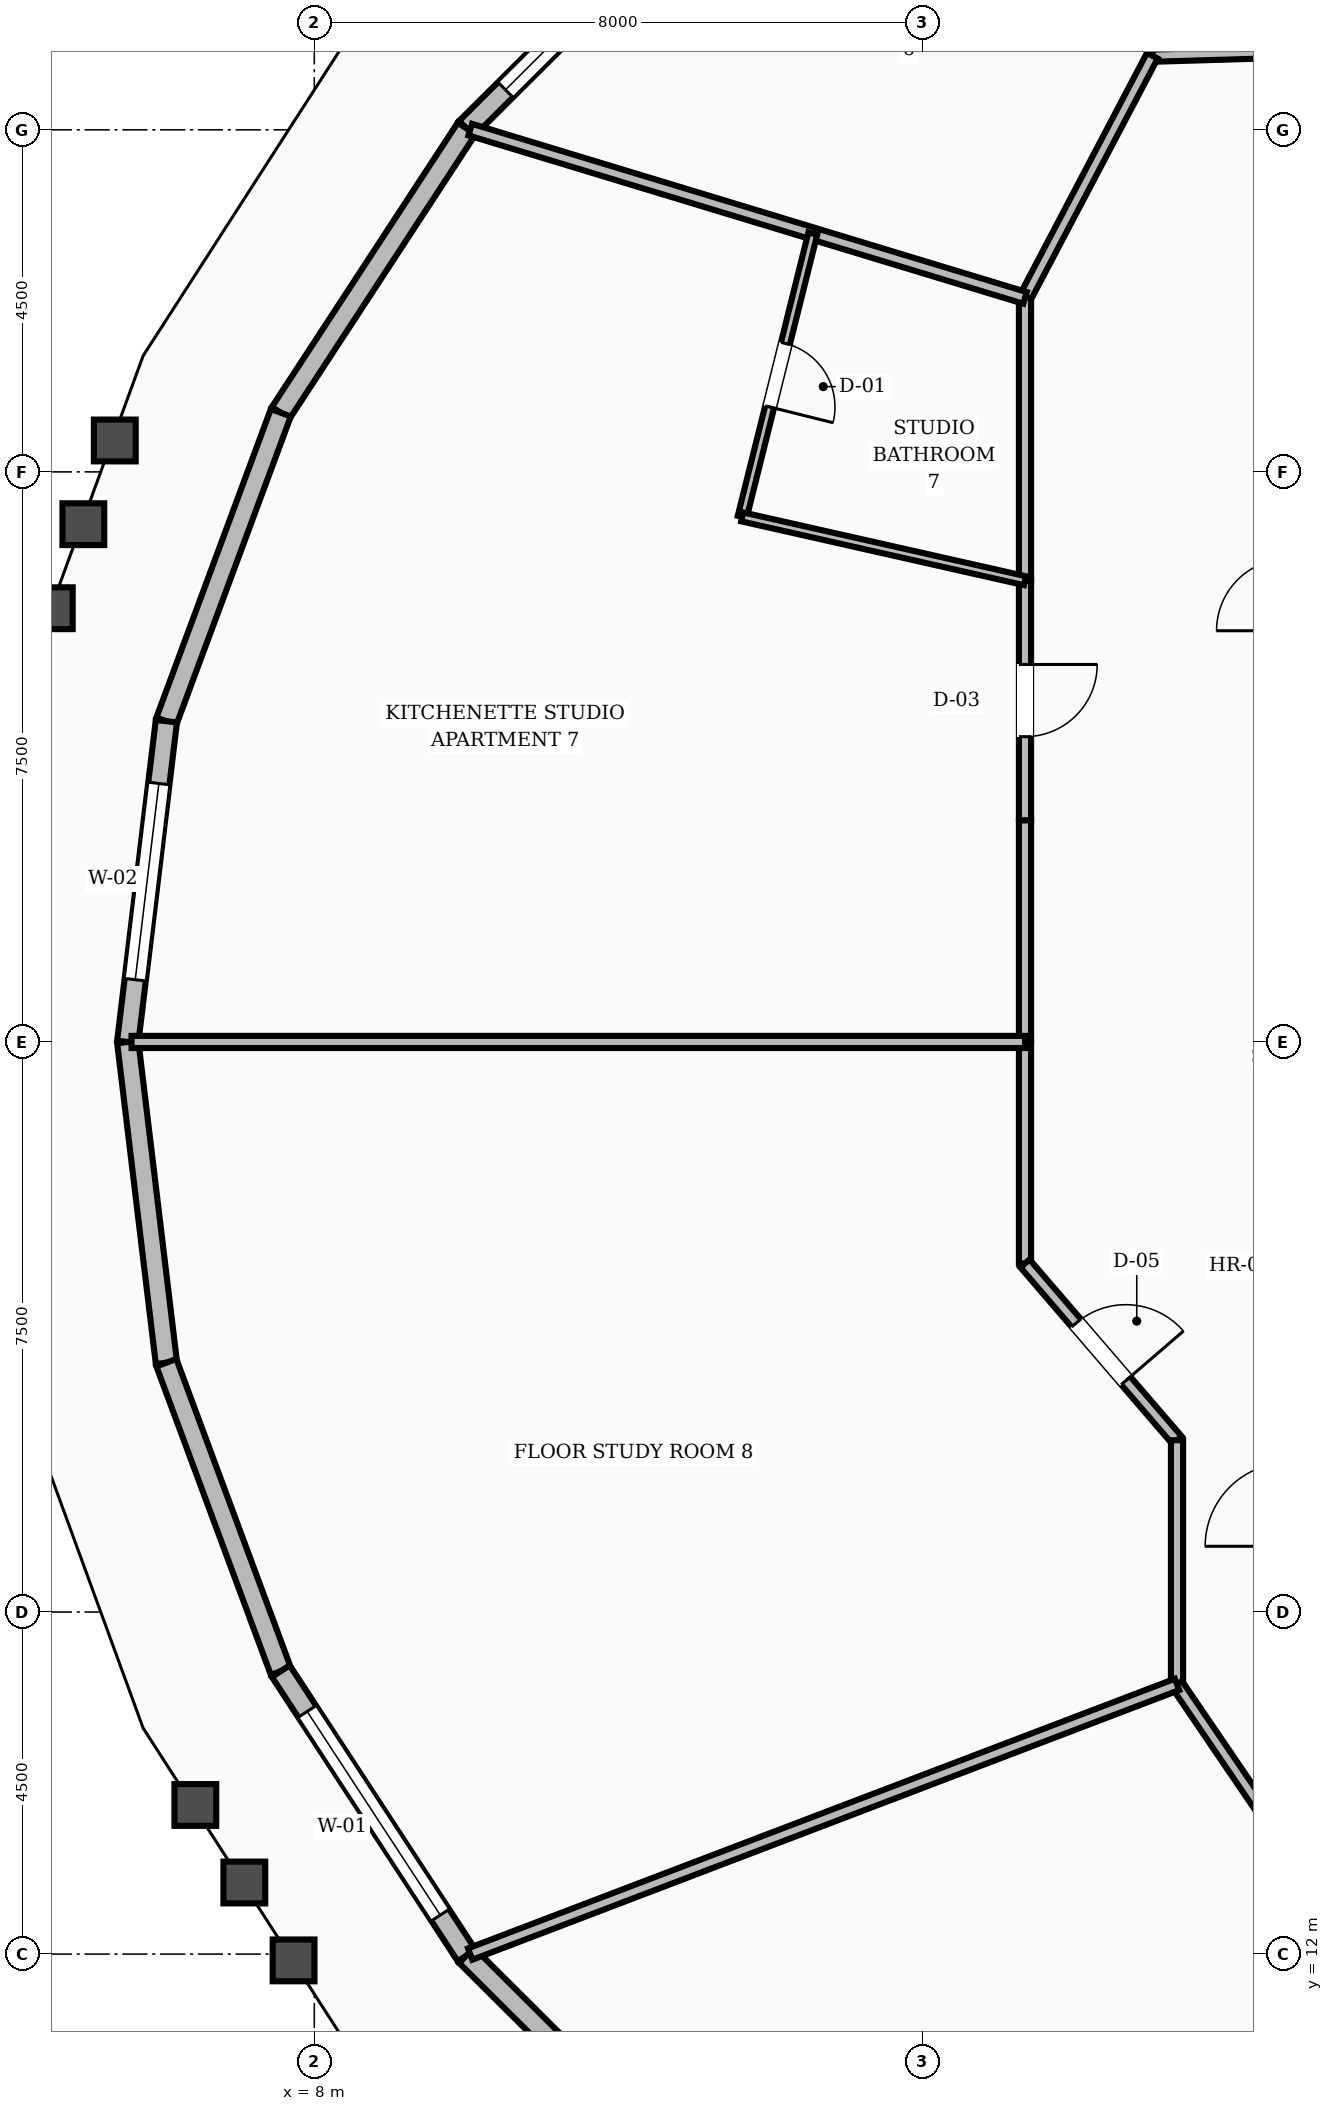
"""IFC4 building model, lengths in metres.
Left out: names, types, materials, properties, quantities, classifications, styles, units other than length and angle.
Written with IfcOpenShell. Run it as: python <this file> out.ifc"""

import sys

from ifc_helpers import new_model, si_unit, direction, frame, frame_2d, origin, place, context, subcontext, project, spatial, rectangle, extrude, element, fill, save


model = new_model("IFC4")
c1 = context("Model", 3, precision=1e-05, world=origin(), true_north=direction((0.0, 1.0)))
c2 = subcontext(c1, "Body", "Model", "MODEL_VIEW")
j1 = project(units=[si_unit("LENGTHUNIT", "METRE"), si_unit("PLANEANGLEUNIT", "RADIAN")], contexts=[c1])
p1 = place(None, origin())
s1 = spatial("IfcSite", under=j1, at=p1, CompositionType="ELEMENT")
p2 = place(p1, origin())
s2 = spatial("IfcBuilding", under=s1, at=p2, CompositionType="ELEMENT")
p3 = place(p2, frame((0.0, 0.0, 142.4)))
s3 = spatial("IfcBuildingStorey", under=s2, at=p3, CompositionType="ELEMENT", Elevation=142.4)
p4 = place(p3, frame((13.294, 39.295, 0.0), z_axis=(0.0, 0.0, 1.0), x_axis=(-0.708393596514, -0.705817619799, 0.0)))
e1 = element("IfcWall", 1, at=p4, inside=s3, PredefinedType="STANDARD", context=c2, shape_type="SweptSolid", body=[
    extrude(rectangle(XDim=4.644, YDim=0.28, at=frame_2d((2.322, 0.0))), origin(), (0.0, 0.0, 1.0), 2.82),
])
p5 = place(p4, frame((0.722, 0.0, 0.8)))
e2 = element("IfcOpeningElement", 2, at=p5, cuts=e1, PredefinedType="OPENING", context=c2, shape_type="SweptSolid", body=[
    extrude(rectangle(XDim=3.2, YDim=1.65, at=frame_2d((1.6, 0.825))), frame((0.0, 0.15, 0.0), z_axis=(0.0, -1.0, 0.0), x_axis=(1.0, 0.0, 0.0)), (0.0, 0.0, 1.0), 0.3),
])
p6 = place(p3, frame((10.004, 36.017, 0.0), z_axis=(0.0, 0.0, 1.0), x_axis=(-0.547212555107, -0.836993679506, 0.0)))
e3 = element("IfcWall", 3, at=p6, inside=s3, PredefinedType="STANDARD", context=c2, shape_type="SweptSolid", body=[
    extrude(rectangle(XDim=4.468, YDim=0.28, at=frame_2d((2.234, 0.0))), origin(), (0.0, 0.0, 1.0), 2.82),
])
p7 = place(p3, frame((7.559, 32.278, 0.0), z_axis=(0.0, 0.0, 1.0), x_axis=(-0.347832416273, -0.937556723719, 0.0)))
e4 = element("IfcWall", 4, at=p7, inside=s3, PredefinedType="STANDARD", context=c2, shape_type="SweptSolid", body=[
    extrude(rectangle(XDim=4.328, YDim=0.28, at=frame_2d((2.164, 0.0))), origin(), (0.0, 0.0, 1.0), 2.82),
])
p8 = place(p3, frame((6.054, 28.22, 0.0), z_axis=(0.0, 0.0, 1.0), x_axis=(-0.119586868896, -0.992823741048, 0.0)))
e5 = element("IfcWall", 5, at=p8, inside=s3, PredefinedType="STANDARD", context=c2, shape_type="SweptSolid", body=[
    extrude(rectangle(XDim=4.25, YDim=0.28, at=frame_2d((2.125, 0.0))), origin(), (0.0, 0.0, 1.0), 2.82),
])
p9 = place(p8, frame((0.825, 0.0, 0.8)))
e6 = element("IfcOpeningElement", 6, at=p9, cuts=e5, PredefinedType="OPENING", context=c2, shape_type="SweptSolid", body=[
    extrude(rectangle(XDim=2.6, YDim=1.65, at=frame_2d((1.3, 0.825))), frame((0.0, 0.15, 0.0), z_axis=(0.0, -1.0, 0.0), x_axis=(1.0, 0.0, 0.0)), (0.0, 0.0, 1.0), 0.3),
])
p10 = place(p3, frame((5.545, 24.0, 0.0), z_axis=(0.0, 0.0, 1.0), x_axis=(0.119586868896, -0.992823741048, 0.0)))
e7 = element("IfcWall", 7, at=p10, inside=s3, PredefinedType="STANDARD", context=c2, shape_type="SweptSolid", body=[
    extrude(rectangle(XDim=4.25, YDim=0.28, at=frame_2d((2.125, 0.0))), origin(), (0.0, 0.0, 1.0), 2.82),
])
p11 = place(p3, frame((6.054, 19.78, 0.0), z_axis=(0.0, 0.0, 1.0), x_axis=(0.347832416273, -0.937556723719, 0.0)))
e8 = element("IfcWall", 8, at=p11, inside=s3, PredefinedType="STANDARD", context=c2, shape_type="SweptSolid", body=[
    extrude(rectangle(XDim=4.328, YDim=0.28, at=frame_2d((2.164, 0.0))), origin(), (0.0, 0.0, 1.0), 2.82),
])
p12 = place(p3, frame((7.559, 15.722, 0.0), z_axis=(0.0, 0.0, 1.0), x_axis=(0.547212555107, -0.836993679506, 0.0)))
e9 = element("IfcWall", 9, at=p12, inside=s3, PredefinedType="STANDARD", context=c2, shape_type="SweptSolid", body=[
    extrude(rectangle(XDim=4.468, YDim=0.28, at=frame_2d((2.234, 0.0))), origin(), (0.0, 0.0, 1.0), 2.82),
])
p13 = place(p12, frame((0.634, 0.0, 0.8)))
e10 = element("IfcOpeningElement", 10, at=p13, cuts=e9, PredefinedType="OPENING", context=c2, shape_type="SweptSolid", body=[
    extrude(rectangle(XDim=3.2, YDim=1.65, at=frame_2d((1.6, 0.825))), frame((0.0, 0.15, 0.0), z_axis=(0.0, -1.0, 0.0), x_axis=(1.0, 0.0, 0.0)), (0.0, 0.0, 1.0), 0.3),
])
p14 = place(p3, frame((10.004, 11.983, 0.0), z_axis=(0.0, 0.0, 1.0), x_axis=(0.708393596514, -0.705817619799, 0.0)))
e11 = element("IfcWall", 11, at=p14, inside=s3, PredefinedType="STANDARD", context=c2, shape_type="SweptSolid", body=[
    extrude(rectangle(XDim=4.644, YDim=0.28, at=frame_2d((2.322, 0.0))), origin(), (0.0, 0.0, 1.0), 2.82),
])
p15 = place(p3, frame((23.247, 37.1, 0.0), z_axis=(0.0, 0.0, 1.0), x_axis=(-0.999561990195, -0.029594387265, 0.0)))
e12 = element("IfcWall", 12, at=p15, inside=s3, PredefinedType="SOLIDWALL", context=c2, shape_type="SweptSolid", body=[
    extrude(rectangle(XDim=4.224, YDim=0.16, at=frame_2d((2.112, 0.0))), origin(), (0.0, 0.0, 1.0), 2.8),
])
p16 = place(p15, frame((1.637, 0.0, 0.0)))
e13 = element("IfcOpeningElement", 13, at=p16, cuts=e12, PredefinedType="OPENING", context=c2, shape_type="SweptSolid", body=[
    extrude(rectangle(XDim=0.95, YDim=2.1, at=frame_2d((0.475, 1.05))), frame((0.0, 0.09, 0.0), z_axis=(0.0, -1.0, 0.0), x_axis=(1.0, 0.0, 0.0)), (0.0, 0.0, 1.0), 0.18),
])
p17 = place(p3, frame((19.025, 36.975, 0.0), z_axis=(0.0, 0.0, 1.0), x_axis=(-0.46527115782, -0.885168204185, 0.0)))
e14 = element("IfcWall", 14, at=p17, inside=s3, PredefinedType="SOLIDWALL", context=c2, shape_type="SweptSolid", body=[
    extrude(rectangle(XDim=3.6, YDim=0.16, at=frame_2d((1.8, 0.0))), origin(), (0.0, 0.0, 1.0), 2.8),
])
p18 = place(p3, frame((17.35, 33.789, 0.0), z_axis=(0.0, 0.0, 1.0), x_axis=(0.0, -1.0, 0.0)))
e15 = element("IfcWall", 15, at=p18, inside=s3, PredefinedType="SOLIDWALL", context=c2, shape_type="SweptSolid", body=[
    extrude(rectangle(XDim=3.721, YDim=0.16, at=frame_2d((1.86, 0.0))), origin(), (0.0, 0.0, 1.0), 2.8),
])
p19 = place(p3, frame((17.35, 30.068, 0.0), z_axis=(0.0, 0.0, 1.0), x_axis=(0.0, -1.0, 0.0)))
e16 = element("IfcWall", 16, at=p19, inside=s3, PredefinedType="SOLIDWALL", context=c2, shape_type="SweptSolid", body=[
    extrude(rectangle(XDim=3.154, YDim=0.16, at=frame_2d((1.577, 0.0))), origin(), (0.0, 0.0, 1.0), 2.8),
])
p20 = place(p19, frame((1.102, 0.0, 0.0)))
e17 = element("IfcOpeningElement", 17, at=p20, cuts=e16, PredefinedType="OPENING", context=c2, shape_type="SweptSolid", body=[
    extrude(rectangle(XDim=0.95, YDim=2.1, at=frame_2d((0.475, 1.05))), frame((0.0, 0.09, 0.0), z_axis=(0.0, -1.0, 0.0), x_axis=(1.0, 0.0, 0.0)), (0.0, 0.0, 1.0), 0.18),
])
for number, where, z_axis, x_axis in (
    (18, (17.35, 26.914, 0.0), (0.0, 0.0, 1.0), (0.0, -1.0, 0.0)),
    (19, (17.35, 24.0, 0.0), (0.0, 0.0, 1.0), (0.0, -1.0, 0.0)),
):
    element("IfcWall", number, at=place(p3, frame(where, z_axis=z_axis, x_axis=x_axis)), inside=s3, PredefinedType="SOLIDWALL", context=c2, shape_type="SweptSolid", body=[
        extrude(rectangle(XDim=2.914, YDim=0.16, at=frame_2d((1.457, 0.0))), origin(), (0.0, 0.0, 1.0), 2.8),
    ])
p21 = place(p3, frame((17.35, 21.086, 0.0), z_axis=(0.0, 0.0, 1.0), x_axis=(0.652022797448, -0.758199361388, 0.0)))
e20 = element("IfcWall", 20, at=p21, inside=s3, PredefinedType="SOLIDWALL", context=c2, shape_type="SweptSolid", body=[
    extrude(rectangle(XDim=3.067, YDim=0.16, at=frame_2d((1.534, 0.0))), origin(), (0.0, 0.0, 1.0), 2.8),
])
p22 = place(p21, frame((1.034, 0.0, 0.0)))
e21 = element("IfcOpeningElement", 21, at=p22, cuts=e20, PredefinedType="OPENING", context=c2, shape_type="SweptSolid", body=[
    extrude(rectangle(XDim=1.0, YDim=2.1, at=frame_2d((0.5, 1.05))), frame((0.0, 0.09, 0.0), z_axis=(0.0, -1.0, 0.0), x_axis=(1.0, 0.0, 0.0)), (0.0, 0.0, 1.0), 0.18),
])
p23 = place(p3, frame((19.35, 18.76, 0.0), z_axis=(0.0, 0.0, 1.0), x_axis=(0.0, -1.0, 0.0)))
e22 = element("IfcWall", 22, at=p23, inside=s3, PredefinedType="SOLIDWALL", context=c2, shape_type="SweptSolid", body=[
    extrude(rectangle(XDim=3.213, YDim=0.16, at=frame_2d((1.606, 0.0))), origin(), (0.0, 0.0, 1.0), 2.8),
])
p24 = place(p3, frame((19.35, 15.548, 0.0), z_axis=(0.0, 0.0, 1.0), x_axis=(0.562674669208, -0.826678423955, 0.0)))
e23 = element("IfcWall", 23, at=p24, inside=s3, PredefinedType="SOLIDWALL", context=c2, shape_type="SweptSolid", body=[
    extrude(rectangle(XDim=3.021, YDim=0.16, at=frame_2d((1.511, 0.0))), origin(), (0.0, 0.0, 1.0), 2.8),
])
p25 = place(p3, frame((17.35, 33.789, 0.0), z_axis=(0.0, 0.0, 1.0), x_axis=(-0.956945218229, 0.290268581331, 0.0)))
e24 = element("IfcWall", 24, at=p25, inside=s3, PredefinedType="SOLIDWALL", context=c2, shape_type="SweptSolid", body=[
    extrude(rectangle(XDim=7.627, YDim=0.16, at=frame_2d((3.813, 0.0))), origin(), (0.0, 0.0, 1.0), 2.8),
])
p26 = place(p3, frame((14.558, 34.635, 0.0), z_axis=(0.0, 0.0, 1.0), x_axis=(-0.241802876518, -0.970325393313, 0.0)))
e25 = element("IfcWall", 25, at=p26, inside=s3, PredefinedType="PARTITIONING", context=c2, shape_type="SweptSolid", body=[
    extrude(rectangle(XDim=3.842, YDim=0.12, at=frame_2d((1.921, 0.0))), origin(), (0.0, 0.0, 1.0), 2.8),
])
p27 = place(p26, frame((1.491, 0.0, 0.0)))
e26 = element("IfcOpeningElement", 26, at=p27, cuts=e25, PredefinedType="OPENING", context=c2, shape_type="SweptSolid", body=[
    extrude(rectangle(XDim=0.86, YDim=2.1, at=frame_2d((0.43, 1.05))), frame((0.0, 0.07, 0.0), z_axis=(0.0, -1.0, 0.0), x_axis=(1.0, 0.0, 0.0)), (0.0, 0.0, 1.0), 0.14),
])
p28 = place(p3, frame((17.35, 30.068, 0.0), z_axis=(0.0, 0.0, 1.0), x_axis=(-0.975472488796, 0.220121383791, 0.0)))
e27 = element("IfcWall", 27, at=p28, inside=s3, PredefinedType="PARTITIONING", context=c2, shape_type="SweptSolid", body=[
    extrude(rectangle(XDim=3.814, YDim=0.12, at=frame_2d((1.907, 0.0))), origin(), (0.0, 0.0, 1.0), 2.8),
])
p29 = place(p3, frame((17.35, 24.0, 0.0), z_axis=(0.0, 0.0, 1.0), x_axis=(-1.0, 0.0, 0.0)))
e28 = element("IfcWall", 28, at=p29, inside=s3, PredefinedType="SOLIDWALL", context=c2, shape_type="SweptSolid", body=[
    extrude(rectangle(XDim=11.755, YDim=0.16, at=frame_2d((5.877, 0.0))), origin(), (0.0, 0.0, 1.0), 2.8),
])
p30 = place(p3, frame((19.35, 15.548, 0.0), z_axis=(0.0, 0.0, 1.0), x_axis=(-0.934339604952, -0.356383925871, 0.0)))
e29 = element("IfcWall", 29, at=p30, inside=s3, PredefinedType="SOLIDWALL", context=c2, shape_type="SweptSolid", body=[
    extrude(rectangle(XDim=9.953, YDim=0.16, at=frame_2d((4.977, 0.0))), origin(), (0.0, 0.0, 1.0), 2.8),
])
p31 = place(p5, origin())
e30 = element("IfcWindow", 30, at=p31, inside=s3, PartitioningType="SINGLE_PANEL", PredefinedType="WINDOW", context=c2, shape_type="SweptSolid", body=[
    extrude(rectangle(XDim=3.2, YDim=1.65, at=frame_2d((1.6, 0.825))), frame((0.0, 0.03, 0.0), z_axis=(0.0, -1.0, 0.0), x_axis=(1.0, 0.0, 0.0)), (0.0, 0.0, 1.0), 0.06),
])
fill(e2, e30)
p32 = place(p9, origin())
e31 = element("IfcWindow", 31, at=p32, inside=s3, PartitioningType="SINGLE_PANEL", PredefinedType="WINDOW", context=c2, shape_type="SweptSolid", body=[
    extrude(rectangle(XDim=2.6, YDim=1.65, at=frame_2d((1.3, 0.825))), frame((0.0, 0.03, 0.0), z_axis=(0.0, -1.0, 0.0), x_axis=(1.0, 0.0, 0.0)), (0.0, 0.0, 1.0), 0.06),
])
fill(e6, e31)
p33 = place(p13, origin())
e32 = element("IfcWindow", 32, at=p33, inside=s3, PartitioningType="SINGLE_PANEL", PredefinedType="WINDOW", context=c2, shape_type="SweptSolid", body=[
    extrude(rectangle(XDim=3.2, YDim=1.65, at=frame_2d((1.6, 0.825))), frame((0.0, 0.03, 0.0), z_axis=(0.0, -1.0, 0.0), x_axis=(1.0, 0.0, 0.0)), (0.0, 0.0, 1.0), 0.06),
])
fill(e10, e32)
p34 = place(p27, origin())
e33 = element("IfcDoor", 33, at=p34, inside=s3, OperationType="SINGLE_SWING_RIGHT", PredefinedType="DOOR", context=c2, shape_type="SweptSolid", body=[
    extrude(rectangle(XDim=0.86, YDim=2.1, at=frame_2d((0.43, 1.05))), frame((0.0, 0.025, 0.0), z_axis=(0.0, -1.0, 0.0), x_axis=(1.0, 0.0, 0.0)), (0.0, 0.0, 1.0), 0.05),
])
fill(e26, e33)
p35 = place(p20, origin())
e34 = element("IfcDoor", 34, at=p35, inside=s3, OperationType="SINGLE_SWING_LEFT", PredefinedType="DOOR", context=c2, shape_type="SweptSolid", body=[
    extrude(rectangle(XDim=0.95, YDim=2.1, at=frame_2d((0.475, 1.05))), frame((0.0, 0.025, 0.0), z_axis=(0.0, -1.0, 0.0), x_axis=(1.0, 0.0, 0.0)), (0.0, 0.0, 1.0), 0.05),
])
fill(e17, e34)
p36 = place(p22, origin())
e35 = element("IfcDoor", 35, at=p36, inside=s3, OperationType="SINGLE_SWING_RIGHT", PredefinedType="DOOR", context=c2, shape_type="SweptSolid", body=[
    extrude(rectangle(XDim=1.0, YDim=2.1, at=frame_2d((0.5, 1.05))), frame((0.0, 0.025, 0.0), z_axis=(0.0, -1.0, 0.0), x_axis=(1.0, 0.0, 0.0)), (0.0, 0.0, 1.0), 0.05),
])
fill(e21, e35)
save(model, sys.argv[1])
